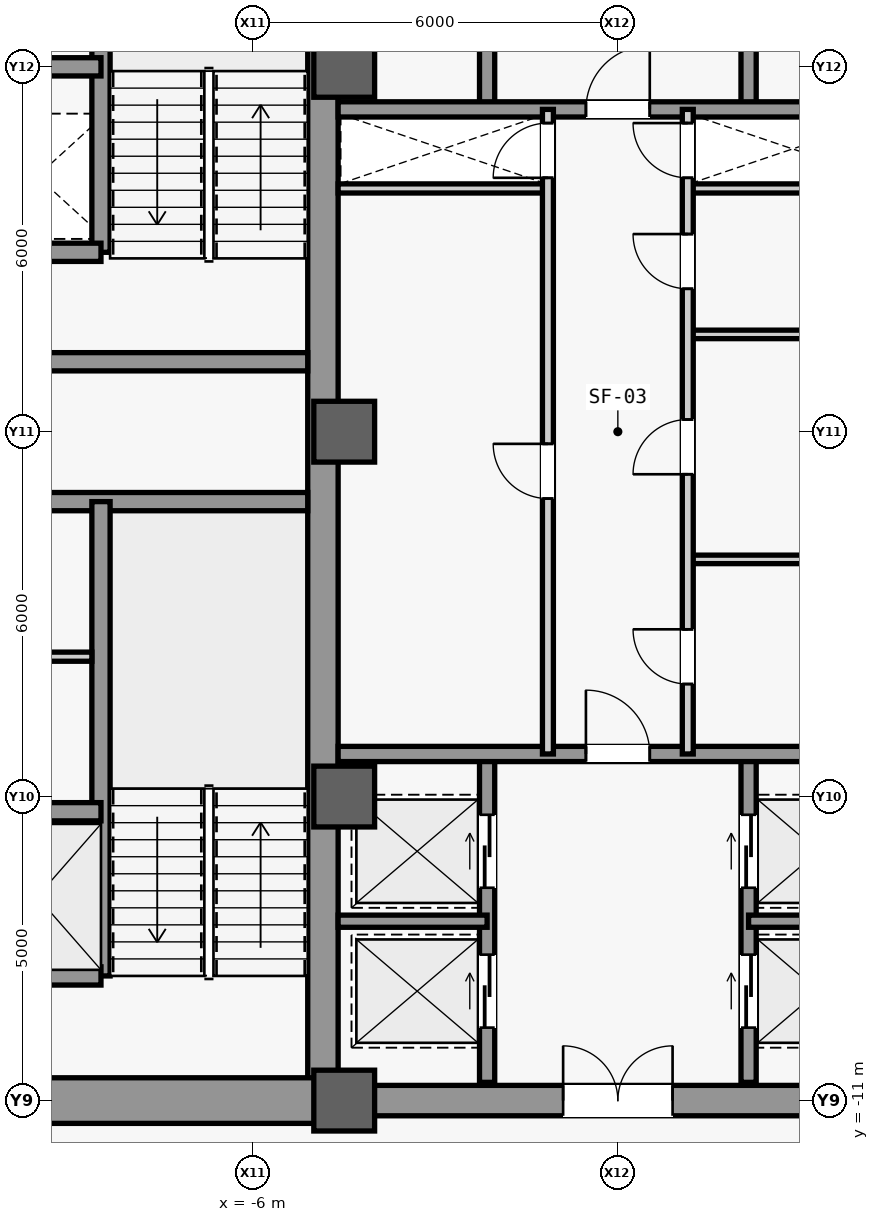
"""IFC4 building model, lengths in metres.
Left out: names, types, materials, properties, quantities, classifications, styles, units other than length and angle.
Written with IfcOpenShell. Run it as: python <this file> out.ifc"""

import sys

from ifc_helpers import new_model, si_unit, direction, frame, frame_2d, origin, origin_2d, place, context, subcontext, project, spatial, rectangle, extrude, source, transform, mapped, element, fill, save


model = new_model("IFC4")
c1 = context("Model", 3, precision=1e-05, world=origin(), true_north=direction((0.0, 1.0)))
c2 = subcontext(c1, "Body", "Model", "MODEL_VIEW")
j1 = project(units=[si_unit("LENGTHUNIT", "METRE"), si_unit("PLANEANGLEUNIT", "RADIAN")], contexts=[c1])
p1 = place(None, origin())
s1 = spatial("IfcSite", under=j1, at=p1, CompositionType="ELEMENT")
p2 = place(p1, origin())
s2 = spatial("IfcBuilding", under=s1, at=p2, CompositionType="ELEMENT")
p3 = place(p2, frame((0.0, 0.0, 91.4)))
s3 = spatial("IfcBuildingStorey", under=s2, at=p3, CompositionType="ELEMENT", Elevation=91.4)
m1 = source(origin(), c2, "Body", "SweptSolid", [
    extrude(rectangle(XDim=21.4, YDim=0.5, at=frame_2d((10.7, 0.0))), origin(), (0.0, 0.0, 1.0), 3.84),
])
p4 = place(p3, frame((-4.85, -10.7, 0.0), z_axis=(0.0, 0.0, 1.0), x_axis=(0.0, 1.0, 0.0)))
e1 = element("IfcWall", 1, at=p4, inside=s3, PredefinedType="SHEAR", context=c2, shape_type="MappedRepresentation", body=[
    mapped(m1, transform((0.0, 0.0, 0.0), scale=1.0)),
])
m2 = source(origin(), c2, "Body", "SweptSolid", [
    extrude(rectangle(XDim=5.85, YDim=0.75, at=frame_2d((2.925, 0.0))), origin(), (0.0, 0.0, 1.0), 3.84),
])
p5 = place(p3, frame((-10.7, -11.0, 0.0), z_axis=(0.0, 0.0, 1.0), x_axis=(1.0, 0.0, 0.0)))
e2 = element("IfcWall", 2, at=p5, inside=s3, PredefinedType="SHEAR", context=c2, shape_type="MappedRepresentation", body=[
    mapped(m2, transform((0.0, 0.0, 0.0), scale=1.0)),
])
m3 = source(origin(), c2, "Body", "SweptSolid", [
    extrude(rectangle(XDim=5.6, YDim=0.3, at=frame_2d((2.8, 0.0))), origin(), (0.0, 0.0, 1.0), 3.84),
])
for number, where, z_axis, x_axis in (
    (3, (-10.7, -1.15, 0.0), (0.0, 0.0, 1.0), (1.0, 0.0, 0.0)),
    (4, (-10.7, 1.15, 0.0), (0.0, 0.0, 1.0), (1.0, 0.0, 0.0)),
):
    element("IfcWall", number, at=place(p3, frame(where, z_axis=z_axis, x_axis=x_axis)), inside=s3, PredefinedType="SHEAR", context=c2, shape_type="MappedRepresentation", body=[
        mapped(m3, transform((0.0, 0.0, 0.0), scale=1.0)),
    ])
m4 = source(origin(), c2, "Body", "SweptSolid", [
    extrude(rectangle(XDim=9.2, YDim=0.5, at=frame_2d((4.6, 0.0))), origin(), (0.0, 0.0, 1.0), 3.84),
])
p6 = place(p3, frame((-4.6, -11.0, 0.0), z_axis=(0.0, 0.0, 1.0), x_axis=(1.0, 0.0, 0.0)))
e5 = element("IfcWall", 5, at=p6, inside=s3, PredefinedType="SHEAR", context=c2, shape_type="MappedRepresentation", body=[
    mapped(m4, transform((0.0, 0.0, 0.0), scale=1.0)),
])
m5 = source(origin(), c2, "Body", "SweptSolid", [
    extrude(rectangle(XDim=1.8, YDim=2.25, at=frame_2d((0.9, 1.125))), frame((0.0, 0.26, 0.0), z_axis=(0.0, -1.0, 0.0), x_axis=(1.0, 0.0, 0.0)), (0.0, 0.0, 1.0), 0.52),
])
p7 = place(p6, frame((3.7, 0.0, 0.0)))
e6 = element("IfcOpeningElement", 6, at=p7, cuts=e5, PredefinedType="OPENING", context=c2, shape_type="MappedRepresentation", body=[
    mapped(m5, transform((0.0, 0.0, 0.0), scale=1.0)),
])
m6 = source(origin(), c2, "Body", "SweptSolid", [
    extrude(rectangle(XDim=1.0, YDim=1.0, at=origin_2d()), origin(), (0.0, 0.0, 1.0), 4.1),
])
for number, where, z_axis, x_axis in (
    (7, (-4.5, -11.0, 0.0), (0.0, 0.0, 1.0), (1.0, 0.0, 0.0)),
    (8, (-4.5, -6.0, 0.0), (0.0, 0.0, 1.0), (1.0, 0.0, 0.0)),
    (9, (-4.5, 0.0, 0.0), (0.0, 0.0, 1.0), (1.0, 0.0, 0.0)),
    (10, (-4.5, 6.0, 0.0), (0.0, 0.0, 1.0), (1.0, 0.0, 0.0)),
):
    element("IfcColumn", number, at=place(p3, frame(where, z_axis=z_axis, x_axis=x_axis)), inside=s3, PredefinedType="COLUMN", context=c2, shape_type="MappedRepresentation", body=[
        mapped(m6, transform((0.0, 0.0, 0.0), scale=1.0)),
    ])
m7 = source(origin(), c2, "Body", "SweptSolid", [
    extrude(rectangle(XDim=7.8, YDim=0.3, at=frame_2d((3.9, 0.0))), origin(), (0.0, 0.0, 1.0), 3.84),
])
p8 = place(p3, frame((-8.5, -8.95, 0.0), z_axis=(0.0, 0.0, 1.0), x_axis=(0.0, 1.0, 0.0)))
e11 = element("IfcWall", 11, at=p8, inside=s3, PredefinedType="SHEAR", context=c2, shape_type="MappedRepresentation", body=[
    mapped(m7, transform((0.0, 0.0, 0.0), scale=1.0)),
])
m8 = source(origin(), c2, "Body", "SweptSolid", [
    extrude(rectangle(XDim=2.2, YDim=0.3, at=frame_2d((1.1, 0.0))), origin(), (0.0, 0.0, 1.0), 3.84),
])
for number, where, z_axis, x_axis in (
    (12, (-10.7, -8.95, 0.0), (0.0, 0.0, 1.0), (1.0, 0.0, 0.0)),
    (13, (-10.7, -6.25, 0.0), (0.0, 0.0, 1.0), (1.0, 0.0, 0.0)),
):
    element("IfcWall", number, at=place(p3, frame(where, z_axis=z_axis, x_axis=x_axis)), inside=s3, PredefinedType="SHEAR", context=c2, shape_type="MappedRepresentation", body=[
        mapped(m8, transform((0.0, 0.0, 0.0), scale=1.0)),
    ])
m9 = source(origin(), c2, "Body", "SweptSolid", [
    extrude(rectangle(XDim=7.75, YDim=0.3, at=frame_2d((3.875, 0.0))), origin(), (0.0, 0.0, 1.0), 3.84),
])
p9 = place(p3, frame((-8.5, 2.95, 0.0), z_axis=(0.0, 0.0, 1.0), x_axis=(0.0, 1.0, 0.0)))
e14 = element("IfcWall", 14, at=p9, inside=s3, PredefinedType="SHEAR", context=c2, shape_type="MappedRepresentation", body=[
    mapped(m9, transform((0.0, 0.0, 0.0), scale=1.0)),
])
for number, where, z_axis, x_axis in (
    (15, (-10.7, 2.95, 0.0), (0.0, 0.0, 1.0), (1.0, 0.0, 0.0)),
    (16, (-10.7, 6.0, 0.0), (0.0, 0.0, 1.0), (1.0, 0.0, 0.0)),
):
    element("IfcWall", number, at=place(p3, frame(where, z_axis=z_axis, x_axis=x_axis)), inside=s3, PredefinedType="SHEAR", context=c2, shape_type="MappedRepresentation", body=[
        mapped(m8, transform((0.0, 0.0, 0.0), scale=1.0)),
    ])
m10 = source(origin(), c2, "Body", "SweptSolid", [
    extrude(rectangle(XDim=2.05, YDim=0.15, at=frame_2d((1.025, 0.0))), origin(), (0.0, 0.0, 1.0), 3.84),
])
p10 = place(p3, frame((-10.7, -3.7, 0.0), z_axis=(0.0, 0.0, 1.0), x_axis=(1.0, 0.0, 0.0)))
e17 = element("IfcWall", 17, at=p10, inside=s3, PredefinedType="PARTITIONING", context=c2, shape_type="MappedRepresentation", body=[
    mapped(m10, transform((0.0, 0.0, 0.0), scale=1.0)),
])
m11 = source(origin(), c2, "Body", "SweptSolid", [
    extrude(rectangle(XDim=3.45, YDim=0.15, at=frame_2d((1.725, 0.0))), origin(), (0.0, 0.0, 1.0), 3.84),
])
for number, where, z_axis, x_axis in (
    (18, (-4.6, 4.0, 0.0), (0.0, 0.0, 1.0), (1.0, 0.0, 0.0)),
    (19, (1.15, 4.0, 0.0), (0.0, 0.0, 1.0), (1.0, 0.0, 0.0)),
):
    element("IfcWall", number, at=place(p3, frame(where, z_axis=z_axis, x_axis=x_axis)), inside=s3, PredefinedType="PARTITIONING", context=c2, shape_type="MappedRepresentation", body=[
        mapped(m11, transform((0.0, 0.0, 0.0), scale=1.0)),
    ])
m12 = source(origin(), c2, "Body", "SweptSolid", [
    extrude(rectangle(XDim=5.4, YDim=0.25, at=frame_2d((2.7, 0.0))), origin(), (0.0, 0.0, 1.0), 3.84),
])
p11 = place(p3, frame((-2.15, -10.7, 0.0), z_axis=(0.0, 0.0, 1.0), x_axis=(0.0, 1.0, 0.0)))
e20 = element("IfcWall", 20, at=p11, inside=s3, PredefinedType="SHEAR", context=c2, shape_type="MappedRepresentation", body=[
    mapped(m12, transform((0.0, 0.0, 0.0), scale=1.0)),
])
m13 = source(origin(), c2, "Body", "SweptSolid", [
    extrude(rectangle(XDim=1.2, YDim=2.3, at=frame_2d((0.6, 1.15))), frame((0.0, 0.135, 0.0), z_axis=(0.0, -1.0, 0.0), x_axis=(1.0, 0.0, 0.0)), (0.0, 0.0, 1.0), 0.27),
])
p12 = place(p11, frame((0.9, 0.0, 0.0)))
e21 = element("IfcOpeningElement", 21, at=p12, cuts=e20, PredefinedType="OPENING", context=c2, shape_type="MappedRepresentation", body=[
    mapped(m13, transform((0.0, 0.0, 0.0), scale=1.0)),
])
p13 = place(p11, frame((3.2, 0.0, 0.0)))
e22 = element("IfcOpeningElement", 22, at=p13, cuts=e20, PredefinedType="OPENING", context=c2, shape_type="MappedRepresentation", body=[
    mapped(m13, transform((0.0, 0.0, 0.0), scale=1.0)),
])
p14 = place(p3, frame((2.15, -10.7, 0.0), z_axis=(0.0, 0.0, 1.0), x_axis=(0.0, 1.0, 0.0)))
e23 = element("IfcWall", 23, at=p14, inside=s3, PredefinedType="SHEAR", context=c2, shape_type="MappedRepresentation", body=[
    mapped(m12, transform((0.0, 0.0, 0.0), scale=1.0)),
])
p15 = place(p14, frame((0.9, 0.0, 0.0)))
e24 = element("IfcOpeningElement", 24, at=p15, cuts=e23, PredefinedType="OPENING", context=c2, shape_type="MappedRepresentation", body=[
    mapped(m13, transform((0.0, 0.0, 0.0), scale=1.0)),
])
p16 = place(p14, frame((3.2, 0.0, 0.0)))
e25 = element("IfcOpeningElement", 25, at=p16, cuts=e23, PredefinedType="OPENING", context=c2, shape_type="MappedRepresentation", body=[
    mapped(m13, transform((0.0, 0.0, 0.0), scale=1.0)),
])
m14 = source(origin(), c2, "Body", "SweptSolid", [
    extrude(rectangle(XDim=2.45, YDim=0.2, at=frame_2d((1.225, 0.0))), origin(), (0.0, 0.0, 1.0), 3.84),
])
for number, where, z_axis, x_axis in (
    (26, (-4.6, -8.05, 0.0), (0.0, 0.0, 1.0), (1.0, 0.0, 0.0)),
    (27, (2.15, -8.05, 0.0), (0.0, 0.0, 1.0), (1.0, 0.0, 0.0)),
):
    element("IfcWall", number, at=place(p3, frame(where, z_axis=z_axis, x_axis=x_axis)), inside=s3, PredefinedType="SHEAR", context=c2, shape_type="MappedRepresentation", body=[
        mapped(m14, transform((0.0, 0.0, 0.0), scale=1.0)),
    ])
m15 = source(origin(), c2, "Body", "SweptSolid", [
    extrude(rectangle(XDim=9.2, YDim=0.25, at=frame_2d((4.6, 0.0))), origin(), (0.0, 0.0, 1.0), 3.84),
])
p17 = place(p3, frame((-4.6, -5.3, 0.0), z_axis=(0.0, 0.0, 1.0), x_axis=(1.0, 0.0, 0.0)))
e28 = element("IfcWall", 28, at=p17, inside=s3, PredefinedType="SHEAR", context=c2, shape_type="MappedRepresentation", body=[
    mapped(m15, transform((0.0, 0.0, 0.0), scale=1.0)),
])
m16 = source(origin(), c2, "Body", "SweptSolid", [
    extrude(rectangle(XDim=1.05, YDim=2.2, at=frame_2d((0.525, 1.1))), frame((0.0, 0.135, 0.0), z_axis=(0.0, -1.0, 0.0), x_axis=(1.0, 0.0, 0.0)), (0.0, 0.0, 1.0), 0.27),
])
p18 = place(p17, frame((4.075, 0.0, 0.0)))
e29 = element("IfcOpeningElement", 29, at=p18, cuts=e28, PredefinedType="OPENING", context=c2, shape_type="MappedRepresentation", body=[
    mapped(m16, transform((0.0, 0.0, 0.0), scale=1.0)),
])
for number, where, z_axis, x_axis in (
    (30, (-2.15, 5.3, 0.0), (0.0, 0.0, 1.0), (0.0, 1.0, 0.0)),
    (31, (2.15, 5.3, 0.0), (0.0, 0.0, 1.0), (0.0, 1.0, 0.0)),
):
    element("IfcWall", number, at=place(p3, frame(where, z_axis=z_axis, x_axis=x_axis)), inside=s3, PredefinedType="SHEAR", context=c2, shape_type="MappedRepresentation", body=[
        mapped(m12, transform((0.0, 0.0, 0.0), scale=1.0)),
    ])
p19 = place(p3, frame((-4.6, 5.3, 0.0), z_axis=(0.0, 0.0, 1.0), x_axis=(1.0, 0.0, 0.0)))
e32 = element("IfcWall", 32, at=p19, inside=s3, PredefinedType="SHEAR", context=c2, shape_type="MappedRepresentation", body=[
    mapped(m15, transform((0.0, 0.0, 0.0), scale=1.0)),
])
p20 = place(p19, frame((4.075, 0.0, 0.0)))
e33 = element("IfcOpeningElement", 33, at=p20, cuts=e32, PredefinedType="OPENING", context=c2, shape_type="MappedRepresentation", body=[
    mapped(m16, transform((0.0, 0.0, 0.0), scale=1.0)),
])
m17 = source(origin(), c2, "Body", "SweptSolid", [
    extrude(rectangle(XDim=10.6, YDim=0.18, at=frame_2d((5.3, 0.0))), origin(), (0.0, 0.0, 1.0), 3.84),
])
p21 = place(p3, frame((-1.15, -5.3, 0.0), z_axis=(0.0, 0.0, 1.0), x_axis=(0.0, 1.0, 0.0)))
e34 = element("IfcWall", 34, at=p21, inside=s3, PredefinedType="PARTITIONING", context=c2, shape_type="MappedRepresentation", body=[
    mapped(m17, transform((0.0, 0.0, 0.0), scale=1.0)),
])
m18 = source(origin(), c2, "Body", "SweptSolid", [
    extrude(rectangle(XDim=0.9, YDim=2.15, at=frame_2d((0.45, 1.075))), frame((0.0, 0.1, 0.0), z_axis=(0.0, -1.0, 0.0), x_axis=(1.0, 0.0, 0.0)), (0.0, 0.0, 1.0), 0.2),
])
p22 = place(p21, frame((4.2, 0.0, 0.0)))
e35 = element("IfcOpeningElement", 35, at=p22, cuts=e34, PredefinedType="OPENING", context=c2, shape_type="MappedRepresentation", body=[
    mapped(m18, transform((0.0, 0.0, 0.0), scale=1.0)),
])
p23 = place(p21, frame((9.475, 0.0, 0.0)))
e36 = element("IfcOpeningElement", 36, at=p23, cuts=e34, PredefinedType="OPENING", context=c2, shape_type="MappedRepresentation", body=[
    mapped(m18, transform((0.0, 0.0, 0.0), scale=1.0)),
])
m19 = source(origin(), c2, "Body", "SweptSolid", [
    extrude(rectangle(XDim=3.45, YDim=0.14, at=frame_2d((1.725, 0.0))), origin(), (0.0, 0.0, 1.0), 3.84),
])
for number, where, z_axis, x_axis in (
    (37, (1.15, -2.1, 0.0), (0.0, 0.0, 1.0), (1.0, 0.0, 0.0)),
    (38, (1.15, 1.6, 0.0), (0.0, 0.0, 1.0), (1.0, 0.0, 0.0)),
):
    element("IfcWall", number, at=place(p3, frame(where, z_axis=z_axis, x_axis=x_axis)), inside=s3, PredefinedType="PARTITIONING", context=c2, shape_type="MappedRepresentation", body=[
        mapped(m19, transform((0.0, 0.0, 0.0), scale=1.0)),
    ])
p24 = place(p3, frame((1.15, -5.3, 0.0), z_axis=(0.0, 0.0, 1.0), x_axis=(0.0, 1.0, 0.0)))
e39 = element("IfcWall", 39, at=p24, inside=s3, PredefinedType="PARTITIONING", context=c2, shape_type="MappedRepresentation", body=[
    mapped(m17, transform((0.0, 0.0, 0.0), scale=1.0)),
])
p25 = place(p24, frame((1.15, 0.0, 0.0)))
e40 = element("IfcOpeningElement", 40, at=p25, cuts=e39, PredefinedType="OPENING", context=c2, shape_type="MappedRepresentation", body=[
    mapped(m18, transform((0.0, 0.0, 0.0), scale=1.0)),
])
p26 = place(p24, frame((4.6, 0.0, 0.0)))
e41 = element("IfcOpeningElement", 41, at=p26, cuts=e39, PredefinedType="OPENING", context=c2, shape_type="MappedRepresentation", body=[
    mapped(m18, transform((0.0, 0.0, 0.0), scale=1.0)),
])
p27 = place(p24, frame((7.65, 0.0, 0.0)))
e42 = element("IfcOpeningElement", 42, at=p27, cuts=e39, PredefinedType="OPENING", context=c2, shape_type="MappedRepresentation", body=[
    mapped(m18, transform((0.0, 0.0, 0.0), scale=1.0)),
])
p28 = place(p24, frame((9.475, 0.0, 0.0)))
e43 = element("IfcOpeningElement", 43, at=p28, cuts=e39, PredefinedType="OPENING", context=c2, shape_type="MappedRepresentation", body=[
    mapped(m18, transform((0.0, 0.0, 0.0), scale=1.0)),
])
m20 = source(origin(), c2, "Body", "SweptSolid", [
    extrude(rectangle(XDim=1.05, YDim=2.2, at=frame_2d((0.525, 1.1))), frame((0.0, 0.025, 0.0), z_axis=(0.0, -1.0, 0.0), x_axis=(1.0, 0.0, 0.0)), (0.0, 0.0, 1.0), 0.05),
])
p29 = place(p18, origin())
e44 = element("IfcDoor", 44, at=p29, inside=s3, OperationType="SINGLE_SWING_LEFT", PredefinedType="DOOR", context=c2, shape_type="MappedRepresentation", body=[
    mapped(m20, transform((0.0, 0.0, 0.0), scale=1.0)),
])
fill(e29, e44)
m21 = source(origin(), c2, "Body", "SweptSolid", [
    extrude(rectangle(XDim=1.8, YDim=2.25, at=frame_2d((0.9, 1.125))), frame((0.0, 0.025, 0.0), z_axis=(0.0, -1.0, 0.0), x_axis=(1.0, 0.0, 0.0)), (0.0, 0.0, 1.0), 0.05),
])
p30 = place(p7, origin())
e45 = element("IfcDoor", 45, at=p30, inside=s3, OperationType="SINGLE_SWING_LEFT", PredefinedType="DOOR", context=c2, shape_type="MappedRepresentation", body=[
    mapped(m21, transform((0.0, 0.0, 0.0), scale=1.0)),
])
fill(e6, e45)
p31 = place(p20, origin())
e46 = element("IfcDoor", 46, at=p31, inside=s3, OperationType="SINGLE_SWING_RIGHT", PredefinedType="DOOR", context=c2, shape_type="MappedRepresentation", body=[
    mapped(m20, transform((0.0, 0.0, 0.0), scale=1.0)),
])
fill(e33, e46)
m22 = source(origin(), c2, "Body", "SweptSolid", [
    extrude(rectangle(XDim=0.9, YDim=2.15, at=frame_2d((0.45, 1.075))), frame((0.0, 0.025, 0.0), z_axis=(0.0, -1.0, 0.0), x_axis=(1.0, 0.0, 0.0)), (0.0, 0.0, 1.0), 0.05),
])
p32 = place(p22, origin())
e47 = element("IfcDoor", 47, at=p32, inside=s3, OperationType="SINGLE_SWING_RIGHT", PredefinedType="DOOR", context=c2, shape_type="MappedRepresentation", body=[
    mapped(m22, transform((0.0, 0.0, 0.0), scale=1.0)),
])
fill(e35, e47)
p33 = place(p25, origin())
e48 = element("IfcDoor", 48, at=p33, inside=s3, OperationType="SINGLE_SWING_RIGHT", PredefinedType="DOOR", context=c2, shape_type="MappedRepresentation", body=[
    mapped(m22, transform((0.0, 0.0, 0.0), scale=1.0)),
])
fill(e40, e48)
p34 = place(p26, origin())
e49 = element("IfcDoor", 49, at=p34, inside=s3, OperationType="SINGLE_SWING_LEFT", PredefinedType="DOOR", context=c2, shape_type="MappedRepresentation", body=[
    mapped(m22, transform((0.0, 0.0, 0.0), scale=1.0)),
])
fill(e41, e49)
p35 = place(p27, origin())
e50 = element("IfcDoor", 50, at=p35, inside=s3, OperationType="SINGLE_SWING_RIGHT", PredefinedType="DOOR", context=c2, shape_type="MappedRepresentation", body=[
    mapped(m22, transform((0.0, 0.0, 0.0), scale=1.0)),
])
fill(e42, e50)
p36 = place(p23, origin())
e51 = element("IfcDoor", 51, at=p36, inside=s3, OperationType="SINGLE_SWING_LEFT", PredefinedType="DOOR", context=c2, shape_type="MappedRepresentation", body=[
    mapped(m22, transform((0.0, 0.0, 0.0), scale=1.0)),
])
fill(e36, e51)
p37 = place(p28, origin())
e52 = element("IfcDoor", 52, at=p37, inside=s3, OperationType="SINGLE_SWING_RIGHT", PredefinedType="DOOR", context=c2, shape_type="MappedRepresentation", body=[
    mapped(m22, transform((0.0, 0.0, 0.0), scale=1.0)),
])
fill(e43, e52)
m23 = source(origin(), c2, "Body", "SweptSolid", [
    extrude(rectangle(XDim=1.2, YDim=2.3, at=frame_2d((0.6, 1.15))), frame((0.0, 0.025, 0.0), z_axis=(0.0, -1.0, 0.0), x_axis=(1.0, 0.0, 0.0)), (0.0, 0.0, 1.0), 0.05),
])
p38 = place(p12, origin())
e53 = element("IfcDoor", 53, at=p38, inside=s3, OperationType="SLIDING_TO_LEFT", PredefinedType="DOOR", context=c2, shape_type="MappedRepresentation", body=[
    mapped(m23, transform((0.0, 0.0, 0.0), scale=1.0)),
])
fill(e21, e53)
p39 = place(p15, origin())
e54 = element("IfcDoor", 54, at=p39, inside=s3, OperationType="SLIDING_TO_LEFT", PredefinedType="DOOR", context=c2, shape_type="MappedRepresentation", body=[
    mapped(m23, transform((0.0, 0.0, 0.0), scale=1.0)),
])
fill(e24, e54)
p40 = place(p13, origin())
e55 = element("IfcDoor", 55, at=p40, inside=s3, OperationType="SLIDING_TO_LEFT", PredefinedType="DOOR", context=c2, shape_type="MappedRepresentation", body=[
    mapped(m23, transform((0.0, 0.0, 0.0), scale=1.0)),
])
fill(e22, e55)
p41 = place(p16, origin())
e56 = element("IfcDoor", 56, at=p41, inside=s3, OperationType="SLIDING_TO_LEFT", PredefinedType="DOOR", context=c2, shape_type="MappedRepresentation", body=[
    mapped(m23, transform((0.0, 0.0, 0.0), scale=1.0)),
])
fill(e25, e56)
save(model, sys.argv[1])
